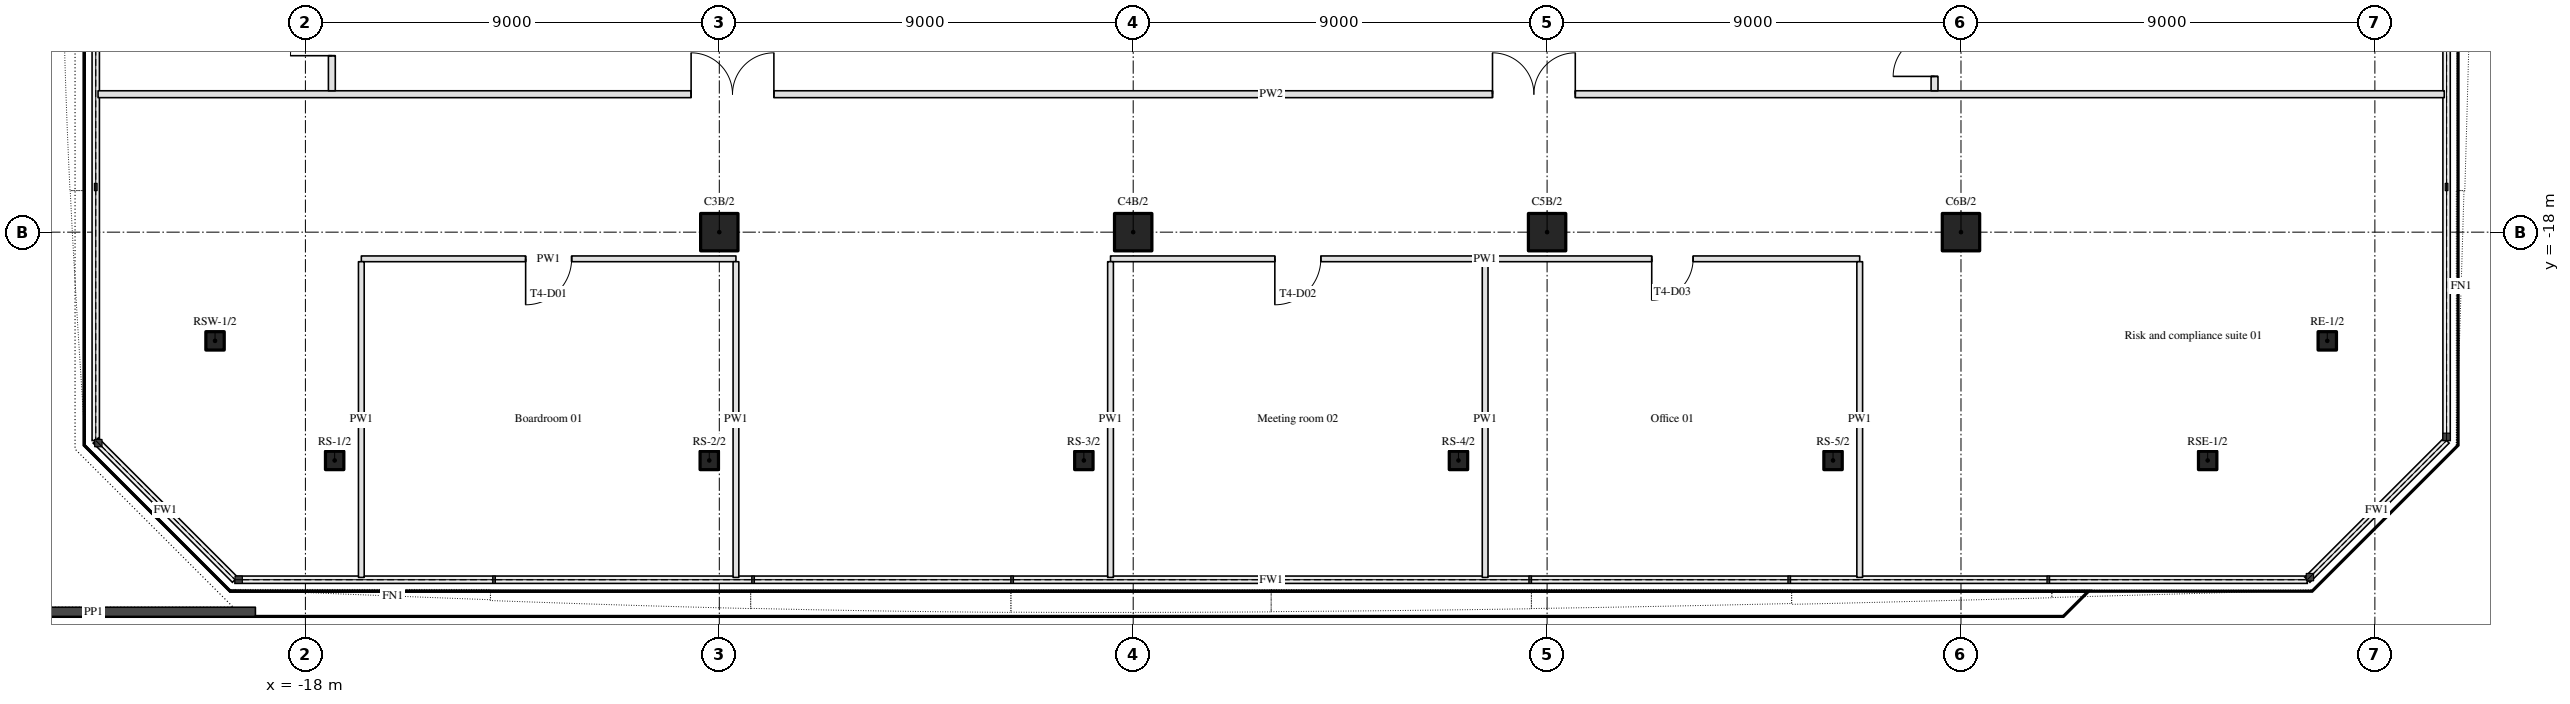
"""IFC4 building model, lengths in metres.
Left out: names, types, materials, properties, quantities, classifications, styles, units other than length and angle.
Written with IfcOpenShell. Run it as: python <this file> out.ifc"""

import sys

from ifc_helpers import new_model, si_unit, direction, frame, frame_2d, origin, origin_2d, place, context, subcontext, project, spatial, rectangle, hollow_rectangle, hollow_circle, extrude, element, fill, save


model = new_model("IFC4")
c1 = context("Model", 3, precision=1e-05, world=origin(), true_north=direction((0.0, 1.0)))
c2 = subcontext(c1, "Body", "Model", "MODEL_VIEW")
j1 = project(units=[si_unit("LENGTHUNIT", "METRE"), si_unit("PLANEANGLEUNIT", "RADIAN")], contexts=[c1])
p1 = place(None, origin())
s1 = spatial("IfcSite", under=j1, at=p1, CompositionType="ELEMENT")
p2 = place(p1, origin())
s2 = spatial("IfcBuilding", under=s1, at=p2, CompositionType="ELEMENT")
p3 = place(p2, frame((0.0, 0.0, 62.1)))
s3 = spatial("IfcBuildingStorey", under=s2, at=p3, CompositionType="ELEMENT", Elevation=62.1)
for number, where, z_axis, x_axis in (
    (1, (-9.0, -18.0, 0.0), (0.0, 0.0, 1.0), (1.0, 0.0, 0.0)),
    (2, (0.0, -18.0, 0.0), (0.0, 0.0, 1.0), (1.0, 0.0, 0.0)),
    (3, (9.0, -18.0, 0.0), (0.0, 0.0, 1.0), (1.0, 0.0, 0.0)),
    (4, (18.0, -18.0, 0.0), (0.0, 0.0, 1.0), (1.0, 0.0, 0.0)),
):
    element("IfcColumn", number, at=place(p3, frame(where, z_axis=z_axis, x_axis=x_axis)), inside=s3, PredefinedType="COLUMN", context=c2, shape_type="SweptSolid", body=[
        extrude(hollow_circle(Radius=0.406, WallThickness=0.036, at=origin_2d()), origin(), (0.0, 0.0, 1.0), 3.9),
    ])
for number, where, z_axis, x_axis in (
    (5, (-17.364, -22.965, 0.0), (0.0, 0.0, 1.0), (1.0, 0.0, 0.0)),
    (6, (-9.218, -22.965, 0.0), (0.0, 0.0, 1.0), (1.0, 0.0, 0.0)),
    (7, (-1.073, -22.965, 0.0), (0.0, 0.0, 1.0), (1.0, 0.0, 0.0)),
    (8, (7.073, -22.965, 0.0), (0.0, 0.0, 1.0), (1.0, 0.0, 0.0)),
    (9, (15.218, -22.965, 0.0), (0.0, 0.0, 1.0), (1.0, 0.0, 0.0)),
    (10, (23.364, -22.965, 0.0), (0.0, 0.0, 1.0), (1.0, 0.0, 0.0)),
    (11, (25.965, -20.364, 0.0), (0.0, 0.0, 1.0), (1.0, 0.0, 0.0)),
    (12, (-19.965, -20.364, 0.0), (0.0, 0.0, 1.0), (1.0, 0.0, 0.0)),
):
    element("IfcColumn", number, at=place(p3, frame(where, z_axis=z_axis, x_axis=x_axis)), inside=s3, PredefinedType="COLUMN", context=c2, shape_type="SweptSolid", body=[
        extrude(hollow_rectangle(XDim=0.4, YDim=0.4, WallThickness=0.025, InnerFilletRadius=0.038, OuterFilletRadius=0.062, at=origin_2d()), origin(), (0.0, 0.0, 1.0), 3.9),
    ])
p4 = place(p3, frame((-26.126, -26.257, 0.0), z_axis=(0.0, 0.0, 1.0), x_axis=(1.0, 0.0, 0.0)))
e13 = element("IfcWall", 13, at=p4, inside=s3, PredefinedType="PARAPET", context=c2, shape_type="SweptSolid", body=[
    extrude(rectangle(XDim=7.039, YDim=0.2, at=frame_2d((3.52, 0.0))), origin(), (0.0, 0.0, 1.0), 1.0),
])
p5 = place(p3, frame((-8.638, -18.58, 0.0), z_axis=(0.0, 0.0, 1.0), x_axis=(-1.0, 0.0, 0.0)))
e14 = element("IfcWall", 14, at=p5, inside=s3, PredefinedType="PARTITIONING", context=c2, shape_type="SweptSolid", body=[
    extrude(rectangle(XDim=8.146, YDim=0.125, at=frame_2d((4.073, 0.0))), origin(), (0.0, 0.0, 1.0), 2.96),
])
p6 = place(p5, frame((3.573, 0.0, 0.0)))
e15 = element("IfcOpeningElement", 15, at=p6, cuts=e14, PredefinedType="OPENING", context=c2, shape_type="SweptSolid", body=[
    extrude(rectangle(XDim=1.0, YDim=2.1, at=frame_2d((0.5, 1.05))), frame((0.0, 0.073, 0.0), z_axis=(0.0, -1.0, 0.0), x_axis=(1.0, 0.0, 0.0)), (0.0, 0.0, 1.0), 0.145),
])
p7 = place(p3, frame((15.798, -18.58, 0.0), z_axis=(0.0, 0.0, 1.0), x_axis=(-1.0, 0.0, 0.0)))
e16 = element("IfcWall", 16, at=p7, inside=s3, PredefinedType="PARTITIONING", context=c2, shape_type="SweptSolid", body=[
    extrude(rectangle(XDim=16.291, YDim=0.125, at=frame_2d((8.146, 0.0))), origin(), (0.0, 0.0, 1.0), 2.96),
])
p8 = place(p7, frame((11.718, 0.0, 0.0)))
e17 = element("IfcOpeningElement", 17, at=p8, cuts=e16, PredefinedType="OPENING", context=c2, shape_type="SweptSolid", body=[
    extrude(rectangle(XDim=1.0, YDim=2.1, at=frame_2d((0.5, 1.05))), frame((0.0, 0.073, 0.0), z_axis=(0.0, -1.0, 0.0), x_axis=(1.0, 0.0, 0.0)), (0.0, 0.0, 1.0), 0.145),
])
p9 = place(p7, frame((3.623, 0.0, 0.0)))
e18 = element("IfcOpeningElement", 18, at=p9, cuts=e16, PredefinedType="OPENING", context=c2, shape_type="SweptSolid", body=[
    extrude(rectangle(XDim=0.9, YDim=2.1, at=frame_2d((0.45, 1.05))), frame((0.0, 0.073, 0.0), z_axis=(0.0, -1.0, 0.0), x_axis=(1.0, 0.0, 0.0)), (0.0, 0.0, 1.0), 0.145),
])
p10 = place(p3, frame((-22.509, -15.0, 0.0), z_axis=(0.0, 0.0, 1.0), x_axis=(1.0, 0.0, 0.0)))
e19 = element("IfcWall", 19, at=p10, inside=s3, PredefinedType="PARTITIONING", context=c2, shape_type="SweptSolid", body=[
    extrude(rectangle(XDim=51.018, YDim=0.15, at=frame_2d((25.509, 0.0))), origin(), (0.0, 0.0, 1.0), 2.96),
])
p11 = place(p10, frame((12.896, 0.0, 0.0)))
e20 = element("IfcOpeningElement", 20, at=p11, cuts=e19, PredefinedType="OPENING", context=c2, shape_type="SweptSolid", body=[
    extrude(rectangle(XDim=1.8, YDim=2.1, at=frame_2d((0.9, 1.05))), frame((0.0, 0.085, 0.0), z_axis=(0.0, -1.0, 0.0), x_axis=(1.0, 0.0, 0.0)), (0.0, 0.0, 1.0), 0.17),
])
p12 = place(p10, frame((30.322, 0.0, 0.0)))
e21 = element("IfcOpeningElement", 21, at=p12, cuts=e19, PredefinedType="OPENING", context=c2, shape_type="SweptSolid", body=[
    extrude(rectangle(XDim=1.8, YDim=2.1, at=frame_2d((0.9, 1.05))), frame((0.0, 0.085, 0.0), z_axis=(0.0, -1.0, 0.0), x_axis=(1.0, 0.0, 0.0)), (0.0, 0.0, 1.0), 0.17),
])
p13 = place(p3, frame((-17.425, -14.925, 0.0), z_axis=(0.0, 0.0, 1.0), x_axis=(0.0, 1.0, 0.0)))
e22 = element("IfcWall", 22, at=p13, inside=s3, PredefinedType="PARTITIONING", context=c2, shape_type="SweptSolid", body=[
    extrude(rectangle(XDim=26.405, YDim=0.15, at=frame_2d((13.203, 0.0))), origin(), (0.0, 0.0, 1.0), 2.96),
])
p14 = place(p13, frame((0.762, 0.0, 0.0)))
e23 = element("IfcOpeningElement", 23, at=p14, cuts=e22, PredefinedType="OPENING", context=c2, shape_type="SweptSolid", body=[
    extrude(rectangle(XDim=0.9, YDim=2.1, at=frame_2d((0.45, 1.05))), frame((0.0, 0.085, 0.0), z_axis=(0.0, -1.0, 0.0), x_axis=(1.0, 0.0, 0.0)), (0.0, 0.0, 1.0), 0.17),
])
p15 = place(p13, frame((6.357, 0.0, 0.0)))
e24 = element("IfcOpeningElement", 24, at=p15, cuts=e22, PredefinedType="OPENING", context=c2, shape_type="SweptSolid", body=[
    extrude(rectangle(XDim=1.0, YDim=2.1, at=frame_2d((0.5, 1.05))), frame((0.0, 0.085, 0.0), z_axis=(0.0, -1.0, 0.0), x_axis=(1.0, 0.0, 0.0)), (0.0, 0.0, 1.0), 0.17),
])
p16 = place(p13, frame((14.168, 0.0, 0.0)))
e25 = element("IfcOpeningElement", 25, at=p16, cuts=e22, PredefinedType="OPENING", context=c2, shape_type="SweptSolid", body=[
    extrude(rectangle(XDim=1.0, YDim=2.1, at=frame_2d((0.5, 1.05))), frame((0.0, 0.085, 0.0), z_axis=(0.0, -1.0, 0.0), x_axis=(1.0, 0.0, 0.0)), (0.0, 0.0, 1.0), 0.17),
])
p17 = place(p13, frame((21.052, 0.0, 0.0)))
e26 = element("IfcOpeningElement", 26, at=p17, cuts=e22, PredefinedType="OPENING", context=c2, shape_type="SweptSolid", body=[
    extrude(rectangle(XDim=1.0, YDim=2.1, at=frame_2d((0.5, 1.05))), frame((0.0, 0.085, 0.0), z_axis=(0.0, -1.0, 0.0), x_axis=(1.0, 0.0, 0.0)), (0.0, 0.0, 1.0), 0.17),
])
for number, where, z_axis, x_axis in (
    (27, (-16.784, -25.509, 0.0), (0.0, 0.0, 1.0), (0.0, 1.0, 0.0)),
    (28, (-8.638, -25.509, 0.0), (0.0, 0.0, 1.0), (0.0, 1.0, 0.0)),
    (29, (-0.493, -25.509, 0.0), (0.0, 0.0, 1.0), (0.0, 1.0, 0.0)),
    (30, (7.653, -25.509, 0.0), (0.0, 0.0, 1.0), (0.0, 1.0, 0.0)),
    (31, (15.798, -25.509, 0.0), (0.0, 0.0, 1.0), (0.0, 1.0, 0.0)),
):
    element("IfcWall", number, at=place(p3, frame(where, z_axis=z_axis, x_axis=x_axis)), inside=s3, PredefinedType="PARTITIONING", context=c2, shape_type="SweptSolid", body=[
        extrude(rectangle(XDim=6.866, YDim=0.125, at=frame_2d((3.433, 0.0))), origin(), (0.0, 0.0, 1.0), 2.96),
    ])
p18 = place(p3, frame((17.425, -14.925, 0.0), z_axis=(0.0, 0.0, 1.0), x_axis=(0.0, 1.0, 0.0)))
e32 = element("IfcWall", 32, at=p18, inside=s3, PredefinedType="PARTITIONING", context=c2, shape_type="SweptSolid", body=[
    extrude(rectangle(XDim=26.405, YDim=0.15, at=frame_2d((13.203, 0.0))), origin(), (0.0, 0.0, 1.0), 2.96),
])
p19 = place(p18, frame((0.312, 0.0, 0.0)))
e33 = element("IfcOpeningElement", 33, at=p19, cuts=e32, PredefinedType="OPENING", context=c2, shape_type="SweptSolid", body=[
    extrude(rectangle(XDim=1.8, YDim=2.1, at=frame_2d((0.9, 1.05))), frame((0.0, 0.085, 0.0), z_axis=(0.0, -1.0, 0.0), x_axis=(1.0, 0.0, 0.0)), (0.0, 0.0, 1.0), 0.17),
])
p20 = place(p18, frame((12.592, 0.0, 0.0)))
e34 = element("IfcOpeningElement", 34, at=p20, cuts=e32, PredefinedType="OPENING", context=c2, shape_type="SweptSolid", body=[
    extrude(rectangle(XDim=1.8, YDim=2.1, at=frame_2d((0.9, 1.05))), frame((0.0, 0.085, 0.0), z_axis=(0.0, -1.0, 0.0), x_axis=(1.0, 0.0, 0.0)), (0.0, 0.0, 1.0), 0.17),
])
p21 = place(p18, frame((21.551, 0.0, 0.0)))
e35 = element("IfcOpeningElement", 35, at=p21, cuts=e32, PredefinedType="OPENING", context=c2, shape_type="SweptSolid", body=[
    extrude(rectangle(XDim=1.8, YDim=2.1, at=frame_2d((0.9, 1.05))), frame((0.0, 0.085, 0.0), z_axis=(0.0, -1.0, 0.0), x_axis=(1.0, 0.0, 0.0)), (0.0, 0.0, 1.0), 0.17),
])
p22 = place(p19, origin())
e36 = element("IfcDoor", 36, at=p22, inside=s3, OperationType="DOUBLE_DOOR_SINGLE_SWING", PredefinedType="DOOR", context=c2, shape_type="SweptSolid", body=[
    extrude(rectangle(XDim=1.8, YDim=2.1, at=frame_2d((0.9, 1.05))), frame((0.0, 0.025, 0.0), z_axis=(0.0, -1.0, 0.0), x_axis=(1.0, 0.0, 0.0)), (0.0, 0.0, 1.0), 0.05),
])
fill(e33, e36)
p23 = place(p11, origin())
e37 = element("IfcDoor", 37, at=p23, inside=s3, OperationType="DOUBLE_DOOR_SINGLE_SWING", PredefinedType="DOOR", context=c2, shape_type="SweptSolid", body=[
    extrude(rectangle(XDim=1.8, YDim=2.1, at=frame_2d((0.9, 1.05))), frame((0.0, 0.025, 0.0), z_axis=(0.0, -1.0, 0.0), x_axis=(1.0, 0.0, 0.0)), (0.0, 0.0, 1.0), 0.05),
])
fill(e20, e37)
p24 = place(p12, origin())
e38 = element("IfcDoor", 38, at=p24, inside=s3, OperationType="DOUBLE_DOOR_SINGLE_SWING", PredefinedType="DOOR", context=c2, shape_type="SweptSolid", body=[
    extrude(rectangle(XDim=1.8, YDim=2.1, at=frame_2d((0.9, 1.05))), frame((0.0, 0.025, 0.0), z_axis=(0.0, -1.0, 0.0), x_axis=(1.0, 0.0, 0.0)), (0.0, 0.0, 1.0), 0.05),
])
fill(e21, e38)
p25 = place(p14, origin())
e39 = element("IfcDoor", 39, at=p25, inside=s3, OperationType="SINGLE_SWING_LEFT", PredefinedType="DOOR", context=c2, shape_type="SweptSolid", body=[
    extrude(rectangle(XDim=0.9, YDim=2.1, at=frame_2d((0.45, 1.05))), frame((0.0, 0.025, 0.0), z_axis=(0.0, -1.0, 0.0), x_axis=(1.0, 0.0, 0.0)), (0.0, 0.0, 1.0), 0.05),
])
fill(e23, e39)
p26 = place(p6, origin())
e40 = element("IfcDoor", 40, at=p26, inside=s3, OperationType="SINGLE_SWING_RIGHT", PredefinedType="DOOR", context=c2, shape_type="SweptSolid", body=[
    extrude(rectangle(XDim=1.0, YDim=2.1, at=frame_2d((0.5, 1.05))), frame((0.0, 0.025, 0.0), z_axis=(0.0, -1.0, 0.0), x_axis=(1.0, 0.0, 0.0)), (0.0, 0.0, 1.0), 0.05),
])
fill(e15, e40)
p27 = place(p8, origin())
e41 = element("IfcDoor", 41, at=p27, inside=s3, OperationType="SINGLE_SWING_RIGHT", PredefinedType="DOOR", context=c2, shape_type="SweptSolid", body=[
    extrude(rectangle(XDim=1.0, YDim=2.1, at=frame_2d((0.5, 1.05))), frame((0.0, 0.025, 0.0), z_axis=(0.0, -1.0, 0.0), x_axis=(1.0, 0.0, 0.0)), (0.0, 0.0, 1.0), 0.05),
])
fill(e17, e41)
p28 = place(p9, origin())
e42 = element("IfcDoor", 42, at=p28, inside=s3, OperationType="SINGLE_SWING_RIGHT", PredefinedType="DOOR", context=c2, shape_type="SweptSolid", body=[
    extrude(rectangle(XDim=0.9, YDim=2.1, at=frame_2d((0.45, 1.05))), frame((0.0, 0.025, 0.0), z_axis=(0.0, -1.0, 0.0), x_axis=(1.0, 0.0, 0.0)), (0.0, 0.0, 1.0), 0.05),
])
fill(e18, e42)
save(model, sys.argv[1])
